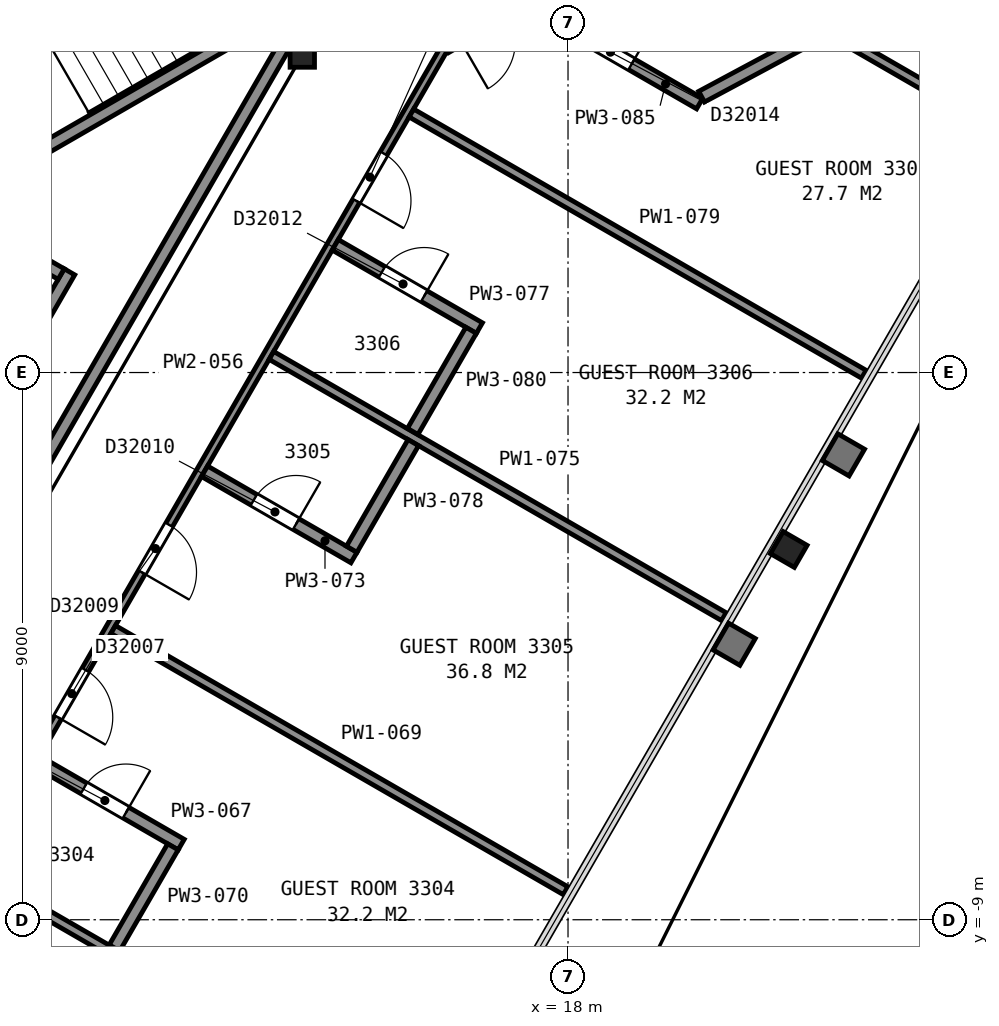
"""IFC4 building model, lengths in metres.
Left out: names, types, materials, properties, quantities, classifications, styles, units other than length and angle.
Written with IfcOpenShell. Run it as: python <this file> out.ifc"""

import sys

from ifc_helpers import new_model, si_unit, direction, frame, frame_2d, origin, origin_2d, place, context, subcontext, project, spatial, rectangle, i_section, extrude, element, fill, save


model = new_model("IFC4")
c1 = context("Model", 3, precision=1e-05, world=origin(), true_north=direction((0.0, 1.0)))
c2 = subcontext(c1, "Body", "Model", "MODEL_VIEW")
j1 = project(units=[si_unit("LENGTHUNIT", "METRE"), si_unit("PLANEANGLEUNIT", "RADIAN")], contexts=[c1])
p1 = place(None, origin())
s1 = spatial("IfcSite", under=j1, at=p1, CompositionType="ELEMENT")
p2 = place(p1, origin())
s2 = spatial("IfcBuilding", under=s1, at=p2, CompositionType="ELEMENT")
p3 = place(p2, frame((0.0, 0.0, 136.0)))
s3 = spatial("IfcBuildingStorey", under=s2, at=p3, CompositionType="ELEMENT", Elevation=136.0)
p4 = place(p3, frame((21.63, -2.91, 0.0), z_axis=(0.0, 0.0, 1.0), x_axis=(-0.5, -0.866025403784, 0.0)))
e1 = element("IfcColumn", 1, at=p4, inside=s3, PredefinedType="COLUMN", context=c2, shape_type="SweptSolid", body=[
    extrude(i_section(OverallWidth=0.419, OverallDepth=0.455, WebThickness=0.042, FlangeThickness=0.068, FilletRadius=0.015, at=origin_2d()), origin(), (0.0, 0.0, 1.0), 3.6),
])
p5 = place(p3, frame((13.63, 5.22, 0.0), z_axis=(0.0, 0.0, 1.0), x_axis=(1.0, 0.0, 0.0)))
e2 = element("IfcColumn", 2, at=p5, inside=s3, PredefinedType="COLUMN", context=c2, shape_type="SweptSolid", body=[
    extrude(i_section(OverallWidth=0.401, OverallDepth=0.399, WebThickness=0.025, FlangeThickness=0.04, FilletRadius=0.015, at=origin_2d()), origin(), (0.0, 0.0, 1.0), 3.6),
])
for number, where, z_axis, x_axis in (
    (3, (6.178, 5.299, 0.0), (0.0, 0.0, 1.0), (0.866, 0.5, 0.0)),
    (4, (7.678, 2.701, 0.0), (0.0, 0.0, 1.0), (0.866, 0.5, 0.0)),
):
    element("IfcWall", number, at=place(p3, frame(where, z_axis=z_axis, x_axis=x_axis)), inside=s3, PredefinedType="PARTITIONING", context=c2, shape_type="SweptSolid", body=[
        extrude(rectangle(XDim=12.0, YDim=0.2, at=frame_2d((6.0, 0.0))), origin(), (0.0, 0.0, 1.0), 3.35),
    ])
p6 = place(p3, frame((7.451, -2.414, 0.0), z_axis=(0.0, 0.0, 1.0), x_axis=(0.500016218704, 0.866016039709, 0.0)))
e5 = element("IfcWall", 5, at=p6, inside=s3, PredefinedType="PARTITIONING", context=c2, shape_type="SweptSolid", body=[
    extrude(rectangle(XDim=4.7, YDim=0.2, at=frame_2d((2.35, 0.0))), origin(), (0.0, 0.0, 1.0), 3.6),
])
p7 = place(p3, frame((9.665, 1.62, 0.0), z_axis=(0.0, 0.0, 1.0), x_axis=(-0.866002029911, 0.500040482552, 0.0)))
e6 = element("IfcWall", 6, at=p7, inside=s3, PredefinedType="PARTITIONING", context=c2, shape_type="SweptSolid", body=[
    extrude(rectangle(XDim=1.75, YDim=0.2, at=frame_2d((0.875, 0.0))), origin(), (0.0, 0.0, 1.0), 3.6),
])
p8 = place(p3, frame((8.492, -3.012, 0.0), z_axis=(0.0, 0.0, 1.0), x_axis=(0.499972957231, 0.866041016371, 0.0)))
e7 = element("IfcWall", 7, at=p8, inside=s3, PredefinedType="PARTITIONING", context=c2, shape_type="SweptSolid", body=[
    extrude(rectangle(XDim=10.349, YDim=0.2, at=frame_2d((5.174, 0.0))), origin(), (0.0, 0.0, 1.0), 3.35),
])
p9 = place(p3, frame((15.962, 5.326, 0.0), z_axis=(0.0, 0.0, 1.0), x_axis=(-0.499992829944, -0.866029543379, 0.0)))
e8 = element("IfcWall", 8, at=p9, inside=s3, PredefinedType="PARTITIONING", context=c2, shape_type="SweptSolid", body=[
    extrude(rectangle(XDim=24.413, YDim=0.125, at=frame_2d((12.207, 0.0))), origin(), (0.0, 0.0, 1.0), 2.613),
])
p10 = place(p9, frame((21.258, 0.0, 0.0)))
e9 = element("IfcOpeningElement", 9, at=p10, cuts=e8, PredefinedType="OPENING", context=c2, shape_type="SweptSolid", body=[
    extrude(rectangle(XDim=0.9, YDim=2.1, at=frame_2d((0.45, 1.05))), frame((0.0, 0.073, 0.0), z_axis=(0.0, -1.0, 0.0), x_axis=(1.0, 0.0, 0.0)), (0.0, 0.0, 1.0), 0.145),
])
p11 = place(p9, frame((18.502, 0.0, 0.0)))
e10 = element("IfcOpeningElement", 10, at=p11, cuts=e8, PredefinedType="OPENING", context=c2, shape_type="SweptSolid", body=[
    extrude(rectangle(XDim=0.9, YDim=2.1, at=frame_2d((0.45, 1.05))), frame((0.0, 0.073, 0.0), z_axis=(0.0, -1.0, 0.0), x_axis=(1.0, 0.0, 0.0)), (0.0, 0.0, 1.0), 0.145),
])
p12 = place(p9, frame((11.799, 0.0, 0.0)))
e11 = element("IfcOpeningElement", 11, at=p12, cuts=e8, PredefinedType="OPENING", context=c2, shape_type="SweptSolid", body=[
    extrude(rectangle(XDim=0.9, YDim=2.1, at=frame_2d((0.45, 1.05))), frame((0.0, 0.073, 0.0), z_axis=(0.0, -1.0, 0.0), x_axis=(1.0, 0.0, 0.0)), (0.0, 0.0, 1.0), 0.145),
])
p13 = place(p9, frame((9.043, 0.0, 0.0)))
e12 = element("IfcOpeningElement", 12, at=p13, cuts=e8, PredefinedType="OPENING", context=c2, shape_type="SweptSolid", body=[
    extrude(rectangle(XDim=0.9, YDim=2.1, at=frame_2d((0.45, 1.05))), frame((0.0, 0.073, 0.0), z_axis=(0.0, -1.0, 0.0), x_axis=(1.0, 0.0, 0.0)), (0.0, 0.0, 1.0), 0.145),
])
p14 = place(p9, frame((1.99, 0.0, 0.0)))
e13 = element("IfcOpeningElement", 13, at=p14, cuts=e8, PredefinedType="OPENING", context=c2, shape_type="SweptSolid", body=[
    extrude(rectangle(XDim=0.9, YDim=2.1, at=frame_2d((0.45, 1.05))), frame((0.0, 0.073, 0.0), z_axis=(0.0, -1.0, 0.0), x_axis=(1.0, 0.0, 0.0)), (0.0, 0.0, 1.0), 0.145),
])
p15 = place(p3, frame((8.218, -8.213, 0.0), z_axis=(0.0, 0.0, 1.0), x_axis=(0.865997709989, -0.500047963993, 0.0)))
e14 = element("IfcWall", 14, at=p15, inside=s3, PredefinedType="PARTITIONING", context=c2, shape_type="SweptSolid", body=[
    extrude(rectangle(XDim=8.592, YDim=0.15, at=frame_2d((4.296, 0.0))), origin(), (0.0, 0.0, 1.0), 2.613),
])
p16 = place(p3, frame((11.639, -7.764, 0.0), z_axis=(0.0, 0.0, 1.0), x_axis=(-0.866028150195, 0.499995243048, 0.0)))
e15 = element("IfcWall", 15, at=p16, inside=s3, PredefinedType="PARTITIONING", context=c2, shape_type="SweptSolid", body=[
    extrude(rectangle(XDim=2.737, YDim=0.2, at=frame_2d((1.369, 0.0))), origin(), (0.0, 0.0, 1.0), 2.613),
])
p17 = place(p16, frame((1.05, 0.0, 0.0)))
e16 = element("IfcOpeningElement", 16, at=p17, cuts=e15, PredefinedType="OPENING", context=c2, shape_type="SweptSolid", body=[
    extrude(rectangle(XDim=0.8, YDim=2.1, at=frame_2d((0.4, 1.05))), frame((0.0, 0.11, 0.0), z_axis=(0.0, -1.0, 0.0), x_axis=(1.0, 0.0, 0.0)), (0.0, 0.0, 1.0), 0.22),
])
p18 = place(p3, frame((10.52, -4.226, 0.0), z_axis=(0.0, 0.0, 1.0), x_axis=(0.866002910178, -0.500038958046, 0.0)))
e17 = element("IfcWall", 17, at=p18, inside=s3, PredefinedType="PARTITIONING", context=c2, shape_type="SweptSolid", body=[
    extrude(rectangle(XDim=8.591, YDim=0.15, at=frame_2d((4.295, 0.0))), origin(), (0.0, 0.0, 1.0), 2.613),
])
p19 = place(p3, frame((10.542, -9.463, 0.0), z_axis=(0.0, 0.0, 1.0), x_axis=(0.500214044309, 0.865901789971, 0.0)))
e18 = element("IfcWall", 18, at=p19, inside=s3, PredefinedType="PARTITIONING", context=c2, shape_type="SweptSolid", body=[
    extrude(rectangle(XDim=1.92, YDim=0.2, at=frame_2d((0.96, 0.0))), origin(), (0.0, 0.0, 1.0), 2.613),
])
p20 = place(p3, frame((12.022, -1.624, 0.0), z_axis=(0.0, 0.0, 1.0), x_axis=(0.866026538634, -0.499998034377, 0.0)))
e19 = element("IfcWall", 19, at=p20, inside=s3, PredefinedType="PARTITIONING", context=c2, shape_type="SweptSolid", body=[
    extrude(rectangle(XDim=2.837, YDim=0.2, at=frame_2d((1.419, 0.0))), origin(), (0.0, 0.0, 1.0), 2.613),
])
p21 = place(p20, frame((0.938, 0.0, 0.0)))
e20 = element("IfcOpeningElement", 20, at=p21, cuts=e19, PredefinedType="OPENING", context=c2, shape_type="SweptSolid", body=[
    extrude(rectangle(XDim=0.8, YDim=2.1, at=frame_2d((0.4, 1.05))), frame((0.0, 0.11, 0.0), z_axis=(0.0, -1.0, 0.0), x_axis=(1.0, 0.0, 0.0)), (0.0, 0.0, 1.0), 0.22),
])
p22 = place(p3, frame((13.122, 0.281, 0.0), z_axis=(0.0, 0.0, 1.0), x_axis=(0.866029425019, -0.499993034952, 0.0)))
e21 = element("IfcWall", 21, at=p22, inside=s3, PredefinedType="PARTITIONING", context=c2, shape_type="SweptSolid", body=[
    extrude(rectangle(XDim=8.591, YDim=0.15, at=frame_2d((4.296, 0.0))), origin(), (0.0, 0.0, 1.0), 2.613),
])
p23 = place(p3, frame((16.542, 0.731, 0.0), z_axis=(0.0, 0.0, 1.0), x_axis=(-0.86596722502, 0.50010075504, 0.0)))
e22 = element("IfcWall", 22, at=p23, inside=s3, PredefinedType="PARTITIONING", context=c2, shape_type="SweptSolid", body=[
    extrude(rectangle(XDim=2.737, YDim=0.2, at=frame_2d((1.369, 0.0))), origin(), (0.0, 0.0, 1.0), 2.613),
])
p24 = place(p23, frame((1.05, 0.0, 0.0)))
e23 = element("IfcOpeningElement", 23, at=p24, cuts=e22, PredefinedType="OPENING", context=c2, shape_type="SweptSolid", body=[
    extrude(rectangle(XDim=0.8, YDim=2.1, at=frame_2d((0.4, 1.05))), frame((0.0, 0.11, 0.0), z_axis=(0.0, -1.0, 0.0), x_axis=(1.0, 0.0, 0.0)), (0.0, 0.0, 1.0), 0.22),
])
p25 = place(p3, frame((14.443, -2.906, 0.0), z_axis=(0.0, 0.0, 1.0), x_axis=(0.500042536776, 0.866000843773, 0.0)))
e24 = element("IfcWall", 24, at=p25, inside=s3, PredefinedType="PARTITIONING", context=c2, shape_type="SweptSolid", body=[
    extrude(rectangle(XDim=2.025, YDim=0.2, at=frame_2d((1.012, 0.0))), origin(), (0.0, 0.0, 1.0), 2.613),
])
p26 = place(p3, frame((15.424, 4.268, 0.0), z_axis=(0.0, 0.0, 1.0), x_axis=(0.866022320763, -0.500005339912, 0.0)))
e25 = element("IfcWall", 25, at=p26, inside=s3, PredefinedType="PARTITIONING", context=c2, shape_type="SweptSolid", body=[
    extrude(rectangle(XDim=8.591, YDim=0.15, at=frame_2d((4.296, 0.0))), origin(), (0.0, 0.0, 1.0), 2.613),
])
p27 = place(p3, frame((15.446, -0.969, 0.0), z_axis=(0.0, 0.0, 1.0), x_axis=(0.499913221443, 0.866075499611, 0.0)))
e26 = element("IfcWall", 26, at=p27, inside=s3, PredefinedType="PARTITIONING", context=c2, shape_type="SweptSolid", body=[
    extrude(rectangle(XDim=1.92, YDim=0.2, at=frame_2d((0.96, 0.0))), origin(), (0.0, 0.0, 1.0), 2.613),
])
p28 = place(p3, frame((19.278, 7.204, 0.0), z_axis=(0.0, 0.0, 1.0), x_axis=(-0.866028547684, -0.499994554566, 0.0)))
e27 = element("IfcWall", 27, at=p28, inside=s3, PredefinedType="PARTITIONING", context=c2, shape_type="SweptSolid", body=[
    extrude(rectangle(XDim=3.78, YDim=0.125, at=frame_2d((1.89, 0.0))), origin(), (0.0, 0.0, 1.0), 2.613),
])
p29 = place(p28, frame((2.615, 0.0, 0.0)))
e28 = element("IfcOpeningElement", 28, at=p29, cuts=e27, PredefinedType="OPENING", context=c2, shape_type="SweptSolid", body=[
    extrude(rectangle(XDim=0.9, YDim=2.1, at=frame_2d((0.45, 1.05))), frame((0.0, 0.073, 0.0), z_axis=(0.0, -1.0, 0.0), x_axis=(1.0, 0.0, 0.0)), (0.0, 0.0, 1.0), 0.145),
])
p30 = place(p3, frame((17.425, 6.004, 0.0), z_axis=(0.0, 0.0, 1.0), x_axis=(0.866145753309, -0.499791490549, 0.0)))
e29 = element("IfcWall", 29, at=p30, inside=s3, PredefinedType="PARTITIONING", context=c2, shape_type="SweptSolid", body=[
    extrude(rectangle(XDim=3.163, YDim=0.2, at=frame_2d((1.582, 0.0))), origin(), (0.0, 0.0, 1.0), 2.613),
])
p31 = place(p30, frame((1.07, 0.0, 0.0)))
e30 = element("IfcOpeningElement", 30, at=p31, cuts=e29, PredefinedType="OPENING", context=c2, shape_type="SweptSolid", body=[
    extrude(rectangle(XDim=0.8, YDim=2.1, at=frame_2d((0.4, 1.05))), frame((0.0, 0.11, 0.0), z_axis=(0.0, -1.0, 0.0), x_axis=(1.0, 0.0, 0.0)), (0.0, 0.0, 1.0), 0.22),
])
p32 = place(p3, frame((19.822, 7.046, 0.0), z_axis=(0.0, 0.0, 1.0), x_axis=(0.866041323853, -0.499972424619, 0.0)))
e31 = element("IfcWall", 31, at=p32, inside=s3, PredefinedType="PARTITIONING", context=c2, shape_type="SweptSolid", body=[
    extrude(rectangle(XDim=6.172, YDim=0.15, at=frame_2d((3.086, 0.0))), origin(), (0.0, 0.0, 1.0), 2.613),
])
p33 = place(p3, frame((20.197, 4.537, 0.0), z_axis=(0.0, 0.0, 1.0), x_axis=(0.881162538645, 0.472813473253, 0.0)))
e32 = element("IfcWall", 32, at=p33, inside=s3, PredefinedType="PARTITIONING", context=c2, shape_type="SweptSolid", body=[
    extrude(rectangle(XDim=2.185, YDim=0.2, at=frame_2d((1.093, 0.0))), origin(), (0.0, 0.0, 1.0), 2.613),
])
p34 = place(p12, origin())
e33 = element("IfcDoor", 33, at=p34, inside=s3, OperationType="SINGLE_SWING_RIGHT", PredefinedType="DOOR", context=c2, shape_type="SweptSolid", body=[
    extrude(rectangle(XDim=0.9, YDim=2.1, at=frame_2d((0.45, 1.05))), frame((0.0, 0.025, 0.0), z_axis=(0.0, -1.0, 0.0), x_axis=(1.0, 0.0, 0.0)), (0.0, 0.0, 1.0), 0.05),
])
fill(e11, e33)
p35 = place(p13, origin())
e34 = element("IfcDoor", 34, at=p35, inside=s3, OperationType="SINGLE_SWING_RIGHT", PredefinedType="DOOR", context=c2, shape_type="SweptSolid", body=[
    extrude(rectangle(XDim=0.9, YDim=2.1, at=frame_2d((0.45, 1.05))), frame((0.0, 0.025, 0.0), z_axis=(0.0, -1.0, 0.0), x_axis=(1.0, 0.0, 0.0)), (0.0, 0.0, 1.0), 0.05),
])
fill(e12, e34)
p36 = place(p14, origin())
e35 = element("IfcDoor", 35, at=p36, inside=s3, OperationType="SINGLE_SWING_RIGHT", PredefinedType="DOOR", context=c2, shape_type="SweptSolid", body=[
    extrude(rectangle(XDim=0.9, YDim=2.1, at=frame_2d((0.45, 1.05))), frame((0.0, 0.025, 0.0), z_axis=(0.0, -1.0, 0.0), x_axis=(1.0, 0.0, 0.0)), (0.0, 0.0, 1.0), 0.05),
])
fill(e13, e35)
p37 = place(p17, origin())
e36 = element("IfcDoor", 36, at=p37, inside=s3, OperationType="SINGLE_SWING_LEFT", PredefinedType="DOOR", context=c2, shape_type="SweptSolid", body=[
    extrude(rectangle(XDim=0.8, YDim=2.1, at=frame_2d((0.4, 1.05))), frame((0.0, 0.025, 0.0), z_axis=(0.0, -1.0, 0.0), x_axis=(1.0, 0.0, 0.0)), (0.0, 0.0, 1.0), 0.05),
])
fill(e16, e36)
p38 = place(p21, origin())
e37 = element("IfcDoor", 37, at=p38, inside=s3, OperationType="SINGLE_SWING_RIGHT", PredefinedType="DOOR", context=c2, shape_type="SweptSolid", body=[
    extrude(rectangle(XDim=0.8, YDim=2.1, at=frame_2d((0.4, 1.05))), frame((0.0, 0.025, 0.0), z_axis=(0.0, -1.0, 0.0), x_axis=(1.0, 0.0, 0.0)), (0.0, 0.0, 1.0), 0.05),
])
fill(e20, e37)
p39 = place(p24, origin())
e38 = element("IfcDoor", 38, at=p39, inside=s3, OperationType="SINGLE_SWING_LEFT", PredefinedType="DOOR", context=c2, shape_type="SweptSolid", body=[
    extrude(rectangle(XDim=0.8, YDim=2.1, at=frame_2d((0.4, 1.05))), frame((0.0, 0.025, 0.0), z_axis=(0.0, -1.0, 0.0), x_axis=(1.0, 0.0, 0.0)), (0.0, 0.0, 1.0), 0.05),
])
fill(e23, e38)
p40 = place(p31, origin())
e39 = element("IfcDoor", 39, at=p40, inside=s3, OperationType="SINGLE_SWING_RIGHT", PredefinedType="DOOR", context=c2, shape_type="SweptSolid", body=[
    extrude(rectangle(XDim=0.8, YDim=2.1, at=frame_2d((0.4, 1.05))), frame((0.0, 0.025, 0.0), z_axis=(0.0, -1.0, 0.0), x_axis=(1.0, 0.0, 0.0)), (0.0, 0.0, 1.0), 0.05),
])
fill(e30, e39)
save(model, sys.argv[1])
